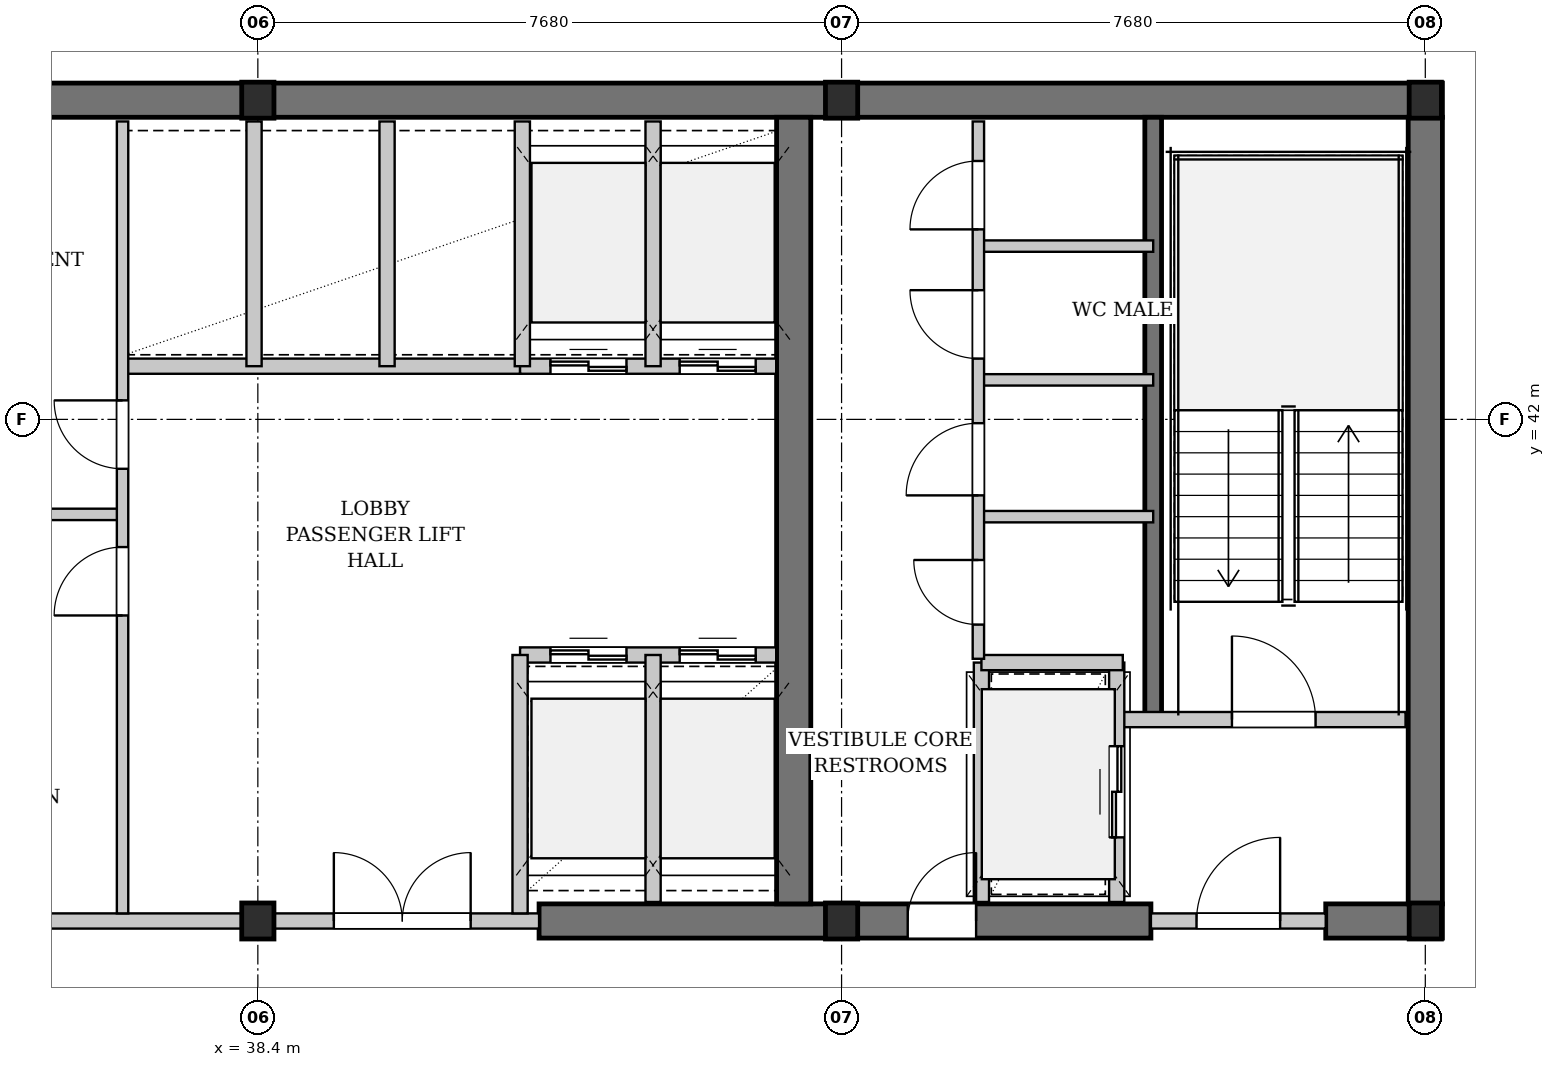
"""IFC4 building model, lengths in metres.
Left out: names, types, materials, properties, quantities, classifications, styles, units other than length and angle.
Written with IfcOpenShell. Run it as: python <this file> out.ifc"""

import sys

from ifc_helpers import new_model, si_unit, direction, frame, frame_2d, origin, origin_2d, place, context, subcontext, project, spatial, rectangle, i_section, extrude, element, fill, save


model = new_model("IFC4")
c1 = context("Model", 3, precision=1e-05, world=origin(), true_north=direction((0.0, 1.0)))
c2 = subcontext(c1, "Body", "Model", "MODEL_VIEW")
j1 = project(units=[si_unit("LENGTHUNIT", "METRE"), si_unit("PLANEANGLEUNIT", "RADIAN")], contexts=[c1])
p1 = place(None, origin())
s1 = spatial("IfcSite", under=j1, at=p1, CompositionType="ELEMENT")
p2 = place(p1, origin())
s2 = spatial("IfcBuilding", under=s1, at=p2, CompositionType="ELEMENT")
p3 = place(p2, frame((0.0, 0.0, 123.7)))
s3 = spatial("IfcBuildingStorey", under=s2, at=p3, CompositionType="ELEMENT", Elevation=123.7)
p4 = place(p3, frame((22.815, 46.2, 0.0), z_axis=(0.0, 0.0, 1.0), x_axis=(1.0, 0.0, 0.0)))
e1 = element("IfcWall", 1, at=p4, inside=s3, PredefinedType="SHEAR", context=c2, shape_type="SweptSolid", body=[
    extrude(rectangle(XDim=31.17, YDim=0.45, at=frame_2d((15.585, 0.0))), origin(), (0.0, 0.0, 1.0), 3.18),
])
p5 = place(p3, frame((42.1, 35.4, 0.0), z_axis=(0.0, 0.0, 1.0), x_axis=(1.0, 0.0, 0.0)))
e2 = element("IfcWall", 2, at=p5, inside=s3, PredefinedType="SHEAR", context=c2, shape_type="SweptSolid", body=[
    extrude(rectangle(XDim=8.05, YDim=0.45, at=frame_2d((4.025, 0.0))), origin(), (0.0, 0.0, 1.0), 3.18),
])
p6 = place(p5, frame((4.85, 0.0, 0.0)))
e3 = element("IfcOpeningElement", 3, at=p6, cuts=e2, PredefinedType="OPENING", context=c2, shape_type="SweptSolid", body=[
    extrude(rectangle(XDim=0.9, YDim=2.15, at=frame_2d((0.45, 1.075))), frame((0.0, 0.235, 0.0), z_axis=(0.0, -1.0, 0.0), x_axis=(1.0, 0.0, 0.0)), (0.0, 0.0, 1.0), 0.47),
])
p7 = place(p3, frame((52.45, 35.4, 0.0), z_axis=(0.0, 0.0, 1.0), x_axis=(1.0, 0.0, 0.0)))
e4 = element("IfcWall", 4, at=p7, inside=s3, PredefinedType="SHEAR", context=c2, shape_type="SweptSolid", body=[
    extrude(rectangle(XDim=1.535, YDim=0.45, at=frame_2d((0.768, 0.0))), origin(), (0.0, 0.0, 1.0), 3.18),
])
for number, where, z_axis, x_axis in (
    (5, (45.45, 35.625, 0.0), (0.0, 0.0, 1.0), (0.0, 1.0, 0.0)),
    (6, (53.76, 35.625, 0.0), (0.0, 0.0, 1.0), (0.0, 1.0, 0.0)),
):
    element("IfcWall", number, at=place(p3, frame(where, z_axis=z_axis, x_axis=x_axis)), inside=s3, PredefinedType="SHEAR", context=c2, shape_type="SweptSolid", body=[
        extrude(rectangle(XDim=10.35, YDim=0.45, at=frame_2d((5.175, 0.0))), origin(), (0.0, 0.0, 1.0), 3.18),
    ])
p8 = place(p3, frame((50.18, 38.05, 0.0), z_axis=(0.0, 0.0, 1.0), x_axis=(0.0, 1.0, 0.0)))
e7 = element("IfcWall", 7, at=p8, inside=s3, PredefinedType="SHEAR", context=c2, shape_type="SweptSolid", body=[
    extrude(rectangle(XDim=7.925, YDim=0.22, at=frame_2d((3.962, 0.0))), origin(), (0.0, 0.0, 1.0), 3.18),
])
for number, where, z_axis, x_axis in (
    (8, (38.4, 35.4, 0.0), (0.0, 0.0, 1.0), (1.0, 0.0, 0.0)),
    (9, (38.4, 46.2, 0.0), (0.0, 0.0, 1.0), (1.0, 0.0, 0.0)),
    (10, (46.08, 35.4, 0.0), (0.0, 0.0, 1.0), (1.0, 0.0, 0.0)),
    (11, (46.08, 46.2, 0.0), (0.0, 0.0, 1.0), (1.0, 0.0, 0.0)),
    (12, (53.76, 35.4, 0.0), (0.0, 0.0, 1.0), (1.0, 0.0, 0.0)),
    (13, (53.76, 46.2, 0.0), (0.0, 0.0, 1.0), (1.0, 0.0, 0.0)),
):
    element("IfcColumn", number, at=place(p3, frame(where, z_axis=z_axis, x_axis=x_axis)), inside=s3, PredefinedType="COLUMN", context=c2, shape_type="SweptSolid", body=[
        extrude(i_section(OverallWidth=0.424, OverallDepth=0.474, WebThickness=0.047, FlangeThickness=0.077, FilletRadius=0.015, at=origin_2d()), origin(), (0.0, 0.0, 1.0), 3.4),
    ])
p9 = place(p3, frame((35.6, 35.4, 0.0), z_axis=(0.0, 0.0, 1.0), x_axis=(1.0, 0.0, 0.0)))
e14 = element("IfcWall", 14, at=p9, inside=s3, PredefinedType="PARTITIONING", context=c2, shape_type="SweptSolid", body=[
    extrude(rectangle(XDim=6.5, YDim=0.2, at=frame_2d((3.25, 0.0))), origin(), (0.0, 0.0, 1.0), 2.525),
])
p10 = place(p9, frame((3.8, 0.0, 0.0)))
e15 = element("IfcOpeningElement", 15, at=p10, cuts=e14, PredefinedType="OPENING", context=c2, shape_type="SweptSolid", body=[
    extrude(rectangle(XDim=1.8, YDim=2.3, at=frame_2d((0.9, 1.15))), frame((0.0, 0.11, 0.0), z_axis=(0.0, -1.0, 0.0), x_axis=(1.0, 0.0, 0.0)), (0.0, 0.0, 1.0), 0.22),
])
p11 = place(p3, frame((36.6, 42.7, 0.0), z_axis=(0.0, 0.0, 1.0), x_axis=(1.0, 0.0, 0.0)))
e16 = element("IfcWall", 16, at=p11, inside=s3, PredefinedType="PARTITIONING", context=c2, shape_type="SweptSolid", body=[
    extrude(rectangle(XDim=5.25, YDim=0.2, at=frame_2d((2.625, 0.0))), origin(), (0.0, 0.0, 1.0), 3.18),
])
p12 = place(p3, frame((38.35, 42.7, 0.0), z_axis=(0.0, 0.0, 1.0), x_axis=(0.0, 1.0, 0.0)))
e17 = element("IfcWall", 17, at=p12, inside=s3, PredefinedType="PARTITIONING", context=c2, shape_type="SweptSolid", body=[
    extrude(rectangle(XDim=3.22, YDim=0.2, at=frame_2d((1.61, 0.0))), origin(), (0.0, 0.0, 1.0), 2.525),
])
p13 = place(p3, frame((40.1, 42.7, 0.0), z_axis=(0.0, 0.0, 1.0), x_axis=(0.0, 1.0, 0.0)))
e18 = element("IfcWall", 18, at=p13, inside=s3, PredefinedType="PARTITIONING", context=c2, shape_type="SweptSolid", body=[
    extrude(rectangle(XDim=3.22, YDim=0.2, at=frame_2d((1.61, 0.0))), origin(), (0.0, 0.0, 1.0), 3.18),
])
p14 = place(p3, frame((33.05, 40.75, 0.0), z_axis=(0.0, 0.0, 1.0), x_axis=(1.0, 0.0, 0.0)))
e19 = element("IfcWall", 19, at=p14, inside=s3, PredefinedType="PARTITIONING", context=c2, shape_type="SweptSolid", body=[
    extrude(rectangle(XDim=3.57, YDim=0.15, at=frame_2d((1.785, 0.0))), origin(), (0.0, 0.0, 1.0), 3.18),
])
p15 = place(p3, frame((36.62, 35.5, 0.0), z_axis=(0.0, 0.0, 1.0), x_axis=(0.0, 1.0, 0.0)))
e20 = element("IfcWall", 20, at=p15, inside=s3, PredefinedType="PARTITIONING", context=c2, shape_type="SweptSolid", body=[
    extrude(rectangle(XDim=10.42, YDim=0.15, at=frame_2d((5.21, 0.0))), origin(), (0.0, 0.0, 1.0), 3.18),
])
p16 = place(p15, frame((3.92, 0.0, 0.0)))
e21 = element("IfcOpeningElement", 21, at=p16, cuts=e20, PredefinedType="OPENING", context=c2, shape_type="SweptSolid", body=[
    extrude(rectangle(XDim=0.9, YDim=2.15, at=frame_2d((0.45, 1.075))), frame((0.0, 0.085, 0.0), z_axis=(0.0, -1.0, 0.0), x_axis=(1.0, 0.0, 0.0)), (0.0, 0.0, 1.0), 0.17),
])
p17 = place(p15, frame((5.85, 0.0, 0.0)))
e22 = element("IfcOpeningElement", 22, at=p17, cuts=e20, PredefinedType="OPENING", context=c2, shape_type="SweptSolid", body=[
    extrude(rectangle(XDim=0.9, YDim=2.15, at=frame_2d((0.45, 1.075))), frame((0.0, 0.085, 0.0), z_axis=(0.0, -1.0, 0.0), x_axis=(1.0, 0.0, 0.0)), (0.0, 0.0, 1.0), 0.17),
])
p18 = place(p3, frame((41.85, 38.9, 0.0), z_axis=(0.0, 0.0, 1.0), x_axis=(1.0, 0.0, 0.0)))
e23 = element("IfcWall", 23, at=p18, inside=s3, PredefinedType="PARTITIONING", context=c2, shape_type="SweptSolid", body=[
    extrude(rectangle(XDim=3.37, YDim=0.2, at=frame_2d((1.685, 0.0))), origin(), (0.0, 0.0, 1.0), 3.18),
])
p19 = place(p18, frame((0.4, 0.0, 0.0)))
e24 = element("IfcOpeningElement", 24, at=p19, cuts=e23, PredefinedType="OPENING", context=c2, shape_type="SweptSolid", body=[
    extrude(rectangle(XDim=1.0, YDim=2.2, at=frame_2d((0.5, 1.1))), frame((0.0, 0.11, 0.0), z_axis=(0.0, -1.0, 0.0), x_axis=(1.0, 0.0, 0.0)), (0.0, 0.0, 1.0), 0.22),
])
p20 = place(p18, frame((2.1, 0.0, 0.0)))
e25 = element("IfcOpeningElement", 25, at=p20, cuts=e23, PredefinedType="OPENING", context=c2, shape_type="SweptSolid", body=[
    extrude(rectangle(XDim=1.0, YDim=2.2, at=frame_2d((0.5, 1.1))), frame((0.0, 0.11, 0.0), z_axis=(0.0, -1.0, 0.0), x_axis=(1.0, 0.0, 0.0)), (0.0, 0.0, 1.0), 0.22),
])
p21 = place(p3, frame((41.85, 42.7, 0.0), z_axis=(0.0, 0.0, 1.0), x_axis=(1.0, 0.0, 0.0)))
e26 = element("IfcWall", 26, at=p21, inside=s3, PredefinedType="PARTITIONING", context=c2, shape_type="SweptSolid", body=[
    extrude(rectangle(XDim=3.37, YDim=0.2, at=frame_2d((1.685, 0.0))), origin(), (0.0, 0.0, 1.0), 3.18),
])
p22 = place(p21, frame((0.4, 0.0, 0.0)))
e27 = element("IfcOpeningElement", 27, at=p22, cuts=e26, PredefinedType="OPENING", context=c2, shape_type="SweptSolid", body=[
    extrude(rectangle(XDim=1.0, YDim=2.2, at=frame_2d((0.5, 1.1))), frame((0.0, 0.11, 0.0), z_axis=(0.0, -1.0, 0.0), x_axis=(1.0, 0.0, 0.0)), (0.0, 0.0, 1.0), 0.22),
])
p23 = place(p21, frame((2.1, 0.0, 0.0)))
e28 = element("IfcOpeningElement", 28, at=p23, cuts=e26, PredefinedType="OPENING", context=c2, shape_type="SweptSolid", body=[
    extrude(rectangle(XDim=1.0, YDim=2.2, at=frame_2d((0.5, 1.1))), frame((0.0, 0.11, 0.0), z_axis=(0.0, -1.0, 0.0), x_axis=(1.0, 0.0, 0.0)), (0.0, 0.0, 1.0), 0.22),
])
p24 = place(p3, frame((43.6, 35.65, 0.0), z_axis=(0.0, 0.0, 1.0), x_axis=(0.0, 1.0, 0.0)))
e29 = element("IfcWall", 29, at=p24, inside=s3, PredefinedType="PARTITIONING", context=c2, shape_type="SweptSolid", body=[
    extrude(rectangle(XDim=3.25, YDim=0.2, at=frame_2d((1.625, 0.0))), origin(), (0.0, 0.0, 1.0), 3.18),
])
p25 = place(p3, frame((43.6, 42.7, 0.0), z_axis=(0.0, 0.0, 1.0), x_axis=(0.0, 1.0, 0.0)))
e30 = element("IfcWall", 30, at=p25, inside=s3, PredefinedType="PARTITIONING", context=c2, shape_type="SweptSolid", body=[
    extrude(rectangle(XDim=3.22, YDim=0.2, at=frame_2d((1.61, 0.0))), origin(), (0.0, 0.0, 1.0), 3.18),
])
p26 = place(p3, frame((41.85, 35.5, 0.0), z_axis=(0.0, 0.0, 1.0), x_axis=(0.0, 1.0, 0.0)))
e31 = element("IfcWall", 31, at=p26, inside=s3, PredefinedType="PARTITIONING", context=c2, shape_type="SweptSolid", body=[
    extrude(rectangle(XDim=3.4, YDim=0.2, at=frame_2d((1.7, 0.0))), origin(), (0.0, 0.0, 1.0), 3.18),
])
p27 = place(p3, frame((41.88, 42.7, 0.0), z_axis=(0.0, 0.0, 1.0), x_axis=(0.0, 1.0, 0.0)))
e32 = element("IfcWall", 32, at=p27, inside=s3, PredefinedType="PARTITIONING", context=c2, shape_type="SweptSolid", body=[
    extrude(rectangle(XDim=3.22, YDim=0.2, at=frame_2d((1.61, 0.0))), origin(), (0.0, 0.0, 1.0), 3.18),
])
p28 = place(p3, frame((49.78, 38.05, 0.0), z_axis=(0.0, 0.0, 1.0), x_axis=(1.0, 0.0, 0.0)))
e33 = element("IfcWall", 33, at=p28, inside=s3, PredefinedType="PARTITIONING", context=c2, shape_type="SweptSolid", body=[
    extrude(rectangle(XDim=3.72, YDim=0.2, at=frame_2d((1.86, 0.0))), origin(), (0.0, 0.0, 1.0), 3.18),
])
p29 = place(p28, frame((1.436, 0.0, 0.0)))
e34 = element("IfcOpeningElement", 34, at=p29, cuts=e33, PredefinedType="OPENING", context=c2, shape_type="SweptSolid", body=[
    extrude(rectangle(XDim=1.1, YDim=2.15, at=frame_2d((0.55, 1.075))), frame((0.0, 0.11, 0.0), z_axis=(0.0, -1.0, 0.0), x_axis=(1.0, 0.0, 0.0)), (0.0, 0.0, 1.0), 0.22),
])
p30 = place(p3, frame((50.15, 35.4, 0.0), z_axis=(0.0, 0.0, 1.0), x_axis=(1.0, 0.0, 0.0)))
e35 = element("IfcWall", 35, at=p30, inside=s3, PredefinedType="PARTITIONING", context=c2, shape_type="SweptSolid", body=[
    extrude(rectangle(XDim=2.3, YDim=0.2, at=frame_2d((1.15, 0.0))), origin(), (0.0, 0.0, 1.0), 2.525),
])
p31 = place(p30, frame((0.6, 0.0, 0.0)))
e36 = element("IfcOpeningElement", 36, at=p31, cuts=e35, PredefinedType="OPENING", context=c2, shape_type="SweptSolid", body=[
    extrude(rectangle(XDim=1.1, YDim=2.15, at=frame_2d((0.55, 1.075))), frame((0.0, 0.11, 0.0), z_axis=(0.0, -1.0, 0.0), x_axis=(1.0, 0.0, 0.0)), (0.0, 0.0, 1.0), 0.22),
])
p32 = place(p3, frame((49.7, 35.65, 0.0), z_axis=(0.0, 0.0, 1.0), x_axis=(0.0, 1.0, 0.0)))
e37 = element("IfcWall", 37, at=p32, inside=s3, PredefinedType="PARTITIONING", context=c2, shape_type="SweptSolid", body=[
    extrude(rectangle(XDim=3.15, YDim=0.2, at=frame_2d((1.575, 0.0))), origin(), (0.0, 0.0, 1.0), 3.18),
])
p33 = place(p32, frame((0.85, 0.0, 0.0)))
e38 = element("IfcOpeningElement", 38, at=p33, cuts=e37, PredefinedType="OPENING", context=c2, shape_type="SweptSolid", body=[
    extrude(rectangle(XDim=1.2, YDim=2.2, at=frame_2d((0.6, 1.1))), frame((0.0, 0.11, 0.0), z_axis=(0.0, -1.0, 0.0), x_axis=(1.0, 0.0, 0.0)), (0.0, 0.0, 1.0), 0.22),
])
p34 = place(p3, frame((47.92, 35.65, 0.0), z_axis=(0.0, 0.0, 1.0), x_axis=(0.0, 1.0, 0.0)))
e39 = element("IfcWall", 39, at=p34, inside=s3, PredefinedType="PARTITIONING", context=c2, shape_type="SweptSolid", body=[
    extrude(rectangle(XDim=3.15, YDim=0.2, at=frame_2d((1.575, 0.0))), origin(), (0.0, 0.0, 1.0), 3.18),
])
p35 = place(p3, frame((47.92, 38.8, 0.0), z_axis=(0.0, 0.0, 1.0), x_axis=(1.0, 0.0, 0.0)))
e40 = element("IfcWall", 40, at=p35, inside=s3, PredefinedType="PARTITIONING", context=c2, shape_type="SweptSolid", body=[
    extrude(rectangle(XDim=1.86, YDim=0.2, at=frame_2d((0.93, 0.0))), origin(), (0.0, 0.0, 1.0), 3.18),
])
for number, where, z_axis, x_axis in (
    (41, (47.88, 40.72, 0.0), (0.0, 0.0, 1.0), (1.0, 0.0, 0.0)),
    (42, (47.88, 42.52, 0.0), (0.0, 0.0, 1.0), (1.0, 0.0, 0.0)),
    (43, (47.88, 44.28, 0.0), (0.0, 0.0, 1.0), (1.0, 0.0, 0.0)),
):
    element("IfcWall", number, at=place(p3, frame(where, z_axis=z_axis, x_axis=x_axis)), inside=s3, PredefinedType="PARTITIONING", context=c2, shape_type="SweptSolid", body=[
        extrude(rectangle(XDim=2.3, YDim=0.15, at=frame_2d((1.15, 0.0))), origin(), (0.0, 0.0, 1.0), 3.18),
    ])
p36 = place(p3, frame((47.88, 38.85, 0.0), z_axis=(0.0, 0.0, 1.0), x_axis=(0.0, 1.0, 0.0)))
e44 = element("IfcWall", 44, at=p36, inside=s3, PredefinedType="PARTITIONING", context=c2, shape_type="SweptSolid", body=[
    extrude(rectangle(XDim=7.07, YDim=0.15, at=frame_2d((3.535, 0.0))), origin(), (0.0, 0.0, 1.0), 3.18),
])
p37 = place(p36, frame((0.45, 0.0, 0.0)))
e45 = element("IfcOpeningElement", 45, at=p37, cuts=e44, PredefinedType="OPENING", context=c2, shape_type="SweptSolid", body=[
    extrude(rectangle(XDim=0.85, YDim=2.15, at=frame_2d((0.425, 1.075))), frame((0.0, 0.085, 0.0), z_axis=(0.0, -1.0, 0.0), x_axis=(1.0, 0.0, 0.0)), (0.0, 0.0, 1.0), 0.17),
])
p38 = place(p36, frame((2.15, 0.0, 0.0)))
e46 = element("IfcOpeningElement", 46, at=p38, cuts=e44, PredefinedType="OPENING", context=c2, shape_type="SweptSolid", body=[
    extrude(rectangle(XDim=0.95, YDim=2.15, at=frame_2d((0.475, 1.075))), frame((0.0, 0.085, 0.0), z_axis=(0.0, -1.0, 0.0), x_axis=(1.0, 0.0, 0.0)), (0.0, 0.0, 1.0), 0.17),
])
p39 = place(p36, frame((3.95, 0.0, 0.0)))
e47 = element("IfcOpeningElement", 47, at=p39, cuts=e44, PredefinedType="OPENING", context=c2, shape_type="SweptSolid", body=[
    extrude(rectangle(XDim=0.9, YDim=2.15, at=frame_2d((0.45, 1.075))), frame((0.0, 0.085, 0.0), z_axis=(0.0, -1.0, 0.0), x_axis=(1.0, 0.0, 0.0)), (0.0, 0.0, 1.0), 0.17),
])
p40 = place(p36, frame((5.65, 0.0, 0.0)))
e48 = element("IfcOpeningElement", 48, at=p40, cuts=e44, PredefinedType="OPENING", context=c2, shape_type="SweptSolid", body=[
    extrude(rectangle(XDim=0.9, YDim=2.15, at=frame_2d((0.45, 1.075))), frame((0.0, 0.085, 0.0), z_axis=(0.0, -1.0, 0.0), x_axis=(1.0, 0.0, 0.0)), (0.0, 0.0, 1.0), 0.17),
])
p41 = place(p10, origin())
e49 = element("IfcDoor", 49, at=p41, inside=s3, OperationType="DOUBLE_DOOR_SINGLE_SWING", PredefinedType="DOOR", context=c2, shape_type="SweptSolid", body=[
    extrude(rectangle(XDim=1.8, YDim=2.3, at=frame_2d((0.9, 1.15))), frame((0.0, 0.025, 0.0), z_axis=(0.0, -1.0, 0.0), x_axis=(1.0, 0.0, 0.0)), (0.0, 0.0, 1.0), 0.05),
])
fill(e15, e49)
p42 = place(p16, origin())
e50 = element("IfcDoor", 50, at=p42, inside=s3, OperationType="SINGLE_SWING_LEFT", PredefinedType="DOOR", context=c2, shape_type="SweptSolid", body=[
    extrude(rectangle(XDim=0.9, YDim=2.15, at=frame_2d((0.45, 1.075))), frame((0.0, 0.025, 0.0), z_axis=(0.0, -1.0, 0.0), x_axis=(1.0, 0.0, 0.0)), (0.0, 0.0, 1.0), 0.05),
])
fill(e21, e50)
p43 = place(p17, origin())
e51 = element("IfcDoor", 51, at=p43, inside=s3, OperationType="SINGLE_SWING_RIGHT", PredefinedType="DOOR", context=c2, shape_type="SweptSolid", body=[
    extrude(rectangle(XDim=0.9, YDim=2.15, at=frame_2d((0.45, 1.075))), frame((0.0, 0.025, 0.0), z_axis=(0.0, -1.0, 0.0), x_axis=(1.0, 0.0, 0.0)), (0.0, 0.0, 1.0), 0.05),
])
fill(e22, e51)
p44 = place(p19, origin())
e52 = element("IfcDoor", 52, at=p44, inside=s3, OperationType="DOUBLE_DOOR_SLIDING", PredefinedType="DOOR", context=c2, shape_type="SweptSolid", body=[
    extrude(rectangle(XDim=1.0, YDim=2.2, at=frame_2d((0.5, 1.1))), frame((0.0, 0.025, 0.0), z_axis=(0.0, -1.0, 0.0), x_axis=(1.0, 0.0, 0.0)), (0.0, 0.0, 1.0), 0.05),
])
fill(e24, e52)
p45 = place(p20, origin())
e53 = element("IfcDoor", 53, at=p45, inside=s3, OperationType="DOUBLE_DOOR_SLIDING", PredefinedType="DOOR", context=c2, shape_type="SweptSolid", body=[
    extrude(rectangle(XDim=1.0, YDim=2.2, at=frame_2d((0.5, 1.1))), frame((0.0, 0.025, 0.0), z_axis=(0.0, -1.0, 0.0), x_axis=(1.0, 0.0, 0.0)), (0.0, 0.0, 1.0), 0.05),
])
fill(e25, e53)
p46 = place(p22, origin())
e54 = element("IfcDoor", 54, at=p46, inside=s3, OperationType="DOUBLE_DOOR_SLIDING", PredefinedType="DOOR", context=c2, shape_type="SweptSolid", body=[
    extrude(rectangle(XDim=1.0, YDim=2.2, at=frame_2d((0.5, 1.1))), frame((0.0, 0.025, 0.0), z_axis=(0.0, -1.0, 0.0), x_axis=(1.0, 0.0, 0.0)), (0.0, 0.0, 1.0), 0.05),
])
fill(e27, e54)
p47 = place(p23, origin())
e55 = element("IfcDoor", 55, at=p47, inside=s3, OperationType="DOUBLE_DOOR_SLIDING", PredefinedType="DOOR", context=c2, shape_type="SweptSolid", body=[
    extrude(rectangle(XDim=1.0, YDim=2.2, at=frame_2d((0.5, 1.1))), frame((0.0, 0.025, 0.0), z_axis=(0.0, -1.0, 0.0), x_axis=(1.0, 0.0, 0.0)), (0.0, 0.0, 1.0), 0.05),
])
fill(e28, e55)
p48 = place(p29, origin())
e56 = element("IfcDoor", 56, at=p48, inside=s3, OperationType="SINGLE_SWING_LEFT", PredefinedType="DOOR", context=c2, shape_type="SweptSolid", body=[
    extrude(rectangle(XDim=1.1, YDim=2.15, at=frame_2d((0.55, 1.075))), frame((0.0, 0.025, 0.0), z_axis=(0.0, -1.0, 0.0), x_axis=(1.0, 0.0, 0.0)), (0.0, 0.0, 1.0), 0.05),
])
fill(e34, e56)
p49 = place(p31, origin())
e57 = element("IfcDoor", 57, at=p49, inside=s3, OperationType="SINGLE_SWING_RIGHT", PredefinedType="DOOR", context=c2, shape_type="SweptSolid", body=[
    extrude(rectangle(XDim=1.1, YDim=2.15, at=frame_2d((0.55, 1.075))), frame((0.0, 0.025, 0.0), z_axis=(0.0, -1.0, 0.0), x_axis=(1.0, 0.0, 0.0)), (0.0, 0.0, 1.0), 0.05),
])
fill(e36, e57)
p50 = place(p33, origin())
e58 = element("IfcDoor", 58, at=p50, inside=s3, OperationType="DOUBLE_DOOR_SLIDING", PredefinedType="DOOR", context=c2, shape_type="SweptSolid", body=[
    extrude(rectangle(XDim=1.2, YDim=2.2, at=frame_2d((0.6, 1.1))), frame((0.0, 0.025, 0.0), z_axis=(0.0, -1.0, 0.0), x_axis=(1.0, 0.0, 0.0)), (0.0, 0.0, 1.0), 0.05),
])
fill(e38, e58)
p51 = place(p37, origin())
e59 = element("IfcDoor", 59, at=p51, inside=s3, OperationType="SINGLE_SWING_RIGHT", PredefinedType="DOOR", context=c2, shape_type="SweptSolid", body=[
    extrude(rectangle(XDim=0.85, YDim=2.15, at=frame_2d((0.425, 1.075))), frame((0.0, 0.025, 0.0), z_axis=(0.0, -1.0, 0.0), x_axis=(1.0, 0.0, 0.0)), (0.0, 0.0, 1.0), 0.05),
])
fill(e45, e59)
p52 = place(p38, origin())
e60 = element("IfcDoor", 60, at=p52, inside=s3, OperationType="SINGLE_SWING_LEFT", PredefinedType="DOOR", context=c2, shape_type="SweptSolid", body=[
    extrude(rectangle(XDim=0.95, YDim=2.15, at=frame_2d((0.475, 1.075))), frame((0.0, 0.025, 0.0), z_axis=(0.0, -1.0, 0.0), x_axis=(1.0, 0.0, 0.0)), (0.0, 0.0, 1.0), 0.05),
])
fill(e46, e60)
p53 = place(p39, origin())
e61 = element("IfcDoor", 61, at=p53, inside=s3, OperationType="SINGLE_SWING_RIGHT", PredefinedType="DOOR", context=c2, shape_type="SweptSolid", body=[
    extrude(rectangle(XDim=0.9, YDim=2.15, at=frame_2d((0.45, 1.075))), frame((0.0, 0.025, 0.0), z_axis=(0.0, -1.0, 0.0), x_axis=(1.0, 0.0, 0.0)), (0.0, 0.0, 1.0), 0.05),
])
fill(e47, e61)
p54 = place(p40, origin())
e62 = element("IfcDoor", 62, at=p54, inside=s3, OperationType="SINGLE_SWING_LEFT", PredefinedType="DOOR", context=c2, shape_type="SweptSolid", body=[
    extrude(rectangle(XDim=0.9, YDim=2.15, at=frame_2d((0.45, 1.075))), frame((0.0, 0.025, 0.0), z_axis=(0.0, -1.0, 0.0), x_axis=(1.0, 0.0, 0.0)), (0.0, 0.0, 1.0), 0.05),
])
fill(e48, e62)
p55 = place(p6, origin())
e63 = element("IfcDoor", 63, at=p55, inside=s3, OperationType="SINGLE_SWING_RIGHT", PredefinedType="DOOR", context=c2, shape_type="SweptSolid", body=[
    extrude(rectangle(XDim=0.9, YDim=2.15, at=frame_2d((0.45, 1.075))), frame((0.0, 0.025, 0.0), z_axis=(0.0, -1.0, 0.0), x_axis=(1.0, 0.0, 0.0)), (0.0, 0.0, 1.0), 0.05),
])
fill(e3, e63)
save(model, sys.argv[1])
